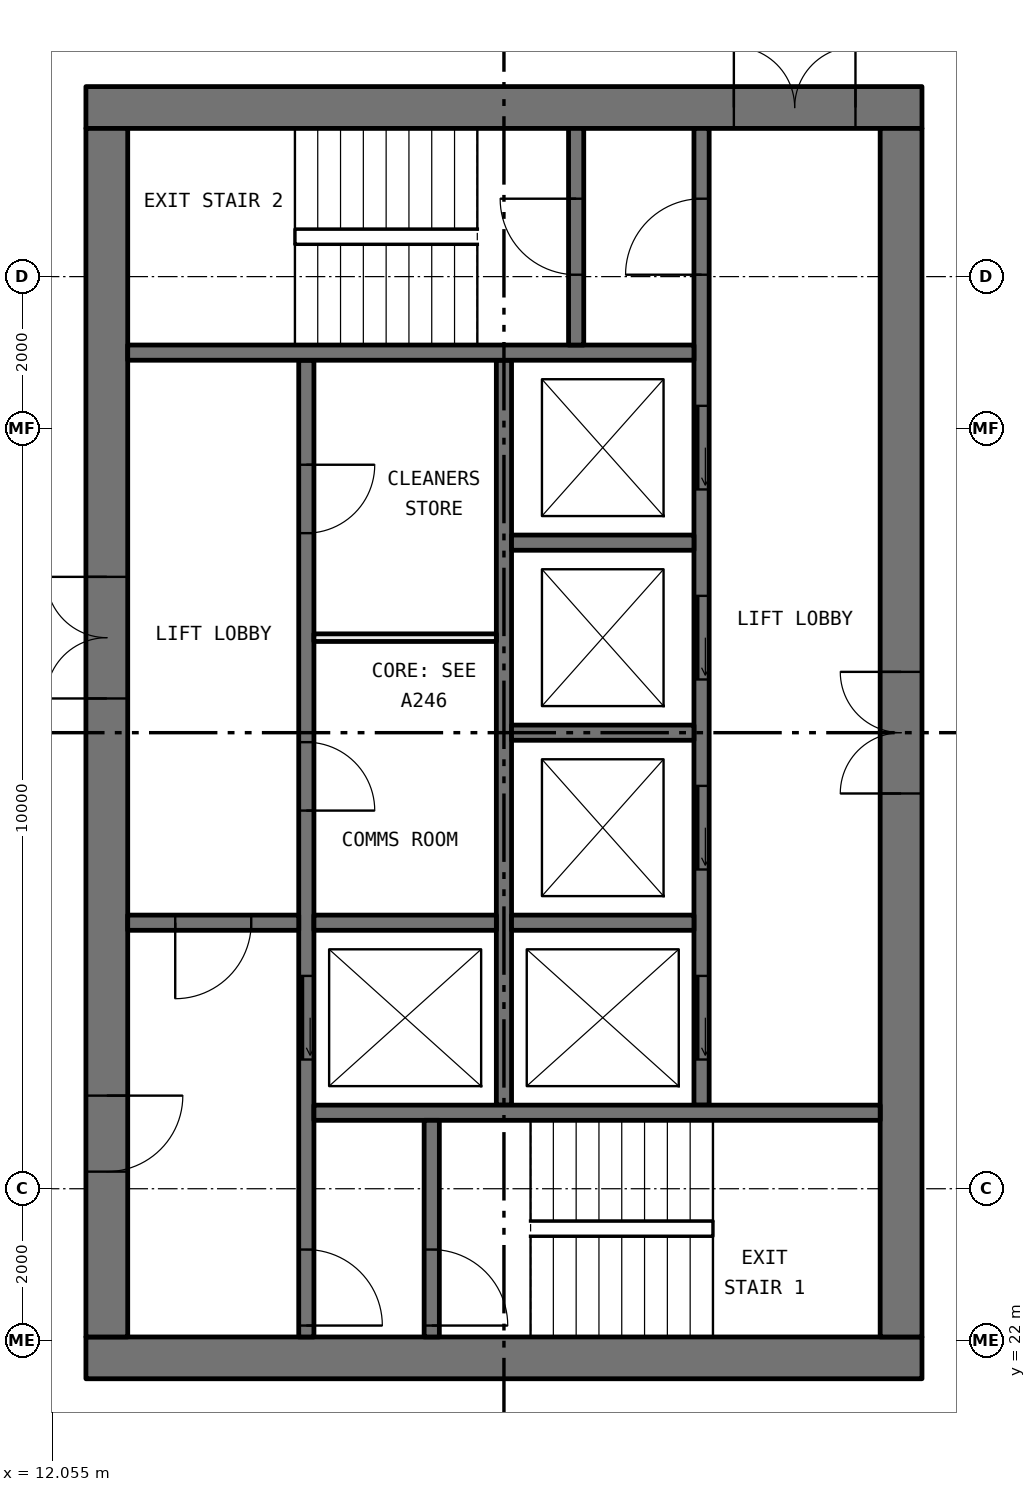
"""IFC4 building model, lengths in metres.
Left out: names, types, materials, properties, quantities, classifications, styles, units other than length and angle.
Written with IfcOpenShell. Run it as: python <this file> out.ifc"""

import sys

from ifc_helpers import new_model, si_unit, direction, frame, frame_2d, origin, place, context, subcontext, project, spatial, rectangle, extrude, element, fill, save


model = new_model("IFC4")
c1 = context("Model", 3, precision=1e-05, world=origin(), true_north=direction((0.0, 1.0)))
c2 = subcontext(c1, "Body", "Model", "MODEL_VIEW")
j1 = project(units=[si_unit("LENGTHUNIT", "METRE"), si_unit("PLANEANGLEUNIT", "RADIAN")], contexts=[c1])
p1 = place(None, origin())
s1 = spatial("IfcSite", under=j1, at=p1, CompositionType="ELEMENT")
p2 = place(p1, origin())
s2 = spatial("IfcBuilding", under=s1, at=p2, CompositionType="ELEMENT")
p3 = place(p2, frame((0.0, 0.0, 172.05)))
s3 = spatial("IfcBuildingStorey", under=s2, at=p3, CompositionType="ELEMENT", Elevation=172.05)
p4 = place(p3, frame((12.5, 21.775, 0.0), z_axis=(0.0, 0.0, 1.0), x_axis=(1.0, 0.0, 0.0)))
e1 = element("IfcWall", 1, at=p4, inside=s3, PredefinedType="SHEAR", context=c2, shape_type="SweptSolid", body=[
    extrude(rectangle(XDim=11.0, YDim=0.55, at=frame_2d((5.5, 0.0))), origin(), (0.0, 0.0, 1.0), 3.05),
])
p5 = place(p3, frame((12.5, 38.225, 0.0), z_axis=(0.0, 0.0, 1.0), x_axis=(1.0, 0.0, 0.0)))
e2 = element("IfcWall", 2, at=p5, inside=s3, PredefinedType="SHEAR", context=c2, shape_type="SweptSolid", body=[
    extrude(rectangle(XDim=11.0, YDim=0.55, at=frame_2d((5.5, 0.0))), origin(), (0.0, 0.0, 1.0), 3.05),
])
p6 = place(p5, frame((8.525, 0.0, 0.0)))
e3 = element("IfcOpeningElement", 3, at=p6, cuts=e2, PredefinedType="OPENING", context=c2, shape_type="SweptSolid", body=[
    extrude(rectangle(XDim=1.6, YDim=2.1, at=frame_2d((0.8, 1.05))), frame((0.0, 0.285, 0.0), z_axis=(0.0, -1.0, 0.0), x_axis=(1.0, 0.0, 0.0)), (0.0, 0.0, 1.0), 0.57),
])
p7 = place(p3, frame((12.775, 22.05, 0.0), z_axis=(0.0, 0.0, 1.0), x_axis=(0.0, 1.0, 0.0)))
e4 = element("IfcWall", 4, at=p7, inside=s3, PredefinedType="SHEAR", context=c2, shape_type="SweptSolid", body=[
    extrude(rectangle(XDim=15.9, YDim=0.55, at=frame_2d((7.95, 0.0))), origin(), (0.0, 0.0, 1.0), 3.05),
])
p8 = place(p7, frame((8.4, 0.0, 0.0)))
e5 = element("IfcOpeningElement", 5, at=p8, cuts=e4, PredefinedType="OPENING", context=c2, shape_type="SweptSolid", body=[
    extrude(rectangle(XDim=1.6, YDim=2.1, at=frame_2d((0.8, 1.05))), frame((0.0, 0.285, 0.0), z_axis=(0.0, -1.0, 0.0), x_axis=(1.0, 0.0, 0.0)), (0.0, 0.0, 1.0), 0.57),
])
p9 = place(p7, frame((2.175, 0.0, 0.0)))
e6 = element("IfcOpeningElement", 6, at=p9, cuts=e4, PredefinedType="OPENING", context=c2, shape_type="SweptSolid", body=[
    extrude(rectangle(XDim=1.0, YDim=2.1, at=frame_2d((0.5, 1.05))), frame((0.0, 0.285, 0.0), z_axis=(0.0, -1.0, 0.0), x_axis=(1.0, 0.0, 0.0)), (0.0, 0.0, 1.0), 0.57),
])
p10 = place(p3, frame((23.225, 22.05, 0.0), z_axis=(0.0, 0.0, 1.0), x_axis=(0.0, 1.0, 0.0)))
e7 = element("IfcWall", 7, at=p10, inside=s3, PredefinedType="SHEAR", context=c2, shape_type="SweptSolid", body=[
    extrude(rectangle(XDim=15.9, YDim=0.55, at=frame_2d((7.95, 0.0))), origin(), (0.0, 0.0, 1.0), 3.05),
])
p11 = place(p10, frame((7.15, 0.0, 0.0)))
e8 = element("IfcOpeningElement", 8, at=p11, cuts=e7, PredefinedType="OPENING", context=c2, shape_type="SweptSolid", body=[
    extrude(rectangle(XDim=1.6, YDim=2.1, at=frame_2d((0.8, 1.05))), frame((0.0, 0.285, 0.0), z_axis=(0.0, -1.0, 0.0), x_axis=(1.0, 0.0, 0.0)), (0.0, 0.0, 1.0), 0.57),
])
p12 = place(p3, frame((15.4, 22.05, 0.0), z_axis=(0.0, 0.0, 1.0), x_axis=(0.0, 1.0, 0.0)))
e9 = element("IfcWall", 9, at=p12, inside=s3, PredefinedType="SOLIDWALL", context=c2, shape_type="SweptSolid", body=[
    extrude(rectangle(XDim=12.85, YDim=0.2, at=frame_2d((6.425, 0.0))), origin(), (0.0, 0.0, 1.0), 3.05),
])
p13 = place(p12, frame((3.65, 0.0, 0.0)))
e10 = element("IfcOpeningElement", 10, at=p13, cuts=e9, PredefinedType="OPENING", context=c2, shape_type="SweptSolid", body=[
    extrude(rectangle(XDim=1.1, YDim=2.1, at=frame_2d((0.55, 1.05))), frame((0.0, 0.11, 0.0), z_axis=(0.0, -1.0, 0.0), x_axis=(1.0, 0.0, 0.0)), (0.0, 0.0, 1.0), 0.22),
])
p14 = place(p12, frame((0.15, 0.0, 0.0)))
e11 = element("IfcOpeningElement", 11, at=p14, cuts=e9, PredefinedType="OPENING", context=c2, shape_type="SweptSolid", body=[
    extrude(rectangle(XDim=1.0, YDim=2.1, at=frame_2d((0.5, 1.05))), frame((0.0, 0.11, 0.0), z_axis=(0.0, -1.0, 0.0), x_axis=(1.0, 0.0, 0.0)), (0.0, 0.0, 1.0), 0.22),
])
p15 = place(p12, frame((6.925, 0.0, 0.0)))
e12 = element("IfcOpeningElement", 12, at=p15, cuts=e9, PredefinedType="OPENING", context=c2, shape_type="SweptSolid", body=[
    extrude(rectangle(XDim=0.9, YDim=2.1, at=frame_2d((0.45, 1.05))), frame((0.0, 0.11, 0.0), z_axis=(0.0, -1.0, 0.0), x_axis=(1.0, 0.0, 0.0)), (0.0, 0.0, 1.0), 0.22),
])
p16 = place(p12, frame((10.575, 0.0, 0.0)))
e13 = element("IfcOpeningElement", 13, at=p16, cuts=e9, PredefinedType="OPENING", context=c2, shape_type="SweptSolid", body=[
    extrude(rectangle(XDim=0.9, YDim=2.1, at=frame_2d((0.45, 1.05))), frame((0.0, 0.11, 0.0), z_axis=(0.0, -1.0, 0.0), x_axis=(1.0, 0.0, 0.0)), (0.0, 0.0, 1.0), 0.22),
])
p17 = place(p3, frame((20.6, 25.1, 0.0), z_axis=(0.0, 0.0, 1.0), x_axis=(0.0, 1.0, 0.0)))
e14 = element("IfcWall", 14, at=p17, inside=s3, PredefinedType="SOLIDWALL", context=c2, shape_type="SweptSolid", body=[
    extrude(rectangle(XDim=12.85, YDim=0.2, at=frame_2d((6.425, 0.0))), origin(), (0.0, 0.0, 1.0), 3.05),
])
p18 = place(p17, frame((0.6, 0.0, 0.0)))
e15 = element("IfcOpeningElement", 15, at=p18, cuts=e14, PredefinedType="OPENING", context=c2, shape_type="SweptSolid", body=[
    extrude(rectangle(XDim=1.1, YDim=2.1, at=frame_2d((0.55, 1.05))), frame((0.0, 0.11, 0.0), z_axis=(0.0, -1.0, 0.0), x_axis=(1.0, 0.0, 0.0)), (0.0, 0.0, 1.0), 0.22),
])
p19 = place(p17, frame((3.1, 0.0, 0.0)))
e16 = element("IfcOpeningElement", 16, at=p19, cuts=e14, PredefinedType="OPENING", context=c2, shape_type="SweptSolid", body=[
    extrude(rectangle(XDim=1.1, YDim=2.1, at=frame_2d((0.55, 1.05))), frame((0.0, 0.11, 0.0), z_axis=(0.0, -1.0, 0.0), x_axis=(1.0, 0.0, 0.0)), (0.0, 0.0, 1.0), 0.22),
])
p20 = place(p17, frame((5.6, 0.0, 0.0)))
e17 = element("IfcOpeningElement", 17, at=p20, cuts=e14, PredefinedType="OPENING", context=c2, shape_type="SweptSolid", body=[
    extrude(rectangle(XDim=1.1, YDim=2.1, at=frame_2d((0.55, 1.05))), frame((0.0, 0.11, 0.0), z_axis=(0.0, -1.0, 0.0), x_axis=(1.0, 0.0, 0.0)), (0.0, 0.0, 1.0), 0.22),
])
p21 = place(p17, frame((8.1, 0.0, 0.0)))
e18 = element("IfcOpeningElement", 18, at=p21, cuts=e14, PredefinedType="OPENING", context=c2, shape_type="SweptSolid", body=[
    extrude(rectangle(XDim=1.1, YDim=2.1, at=frame_2d((0.55, 1.05))), frame((0.0, 0.11, 0.0), z_axis=(0.0, -1.0, 0.0), x_axis=(1.0, 0.0, 0.0)), (0.0, 0.0, 1.0), 0.22),
])
p22 = place(p17, frame((10.925, 0.0, 0.0)))
e19 = element("IfcOpeningElement", 19, at=p22, cuts=e14, PredefinedType="OPENING", context=c2, shape_type="SweptSolid", body=[
    extrude(rectangle(XDim=1.0, YDim=2.1, at=frame_2d((0.5, 1.05))), frame((0.0, 0.11, 0.0), z_axis=(0.0, -1.0, 0.0), x_axis=(1.0, 0.0, 0.0)), (0.0, 0.0, 1.0), 0.22),
])
p23 = place(p3, frame((18.0, 25.1, 0.0), z_axis=(0.0, 0.0, 1.0), x_axis=(0.0, 1.0, 0.0)))
e20 = element("IfcWall", 20, at=p23, inside=s3, PredefinedType="SOLIDWALL", context=c2, shape_type="SweptSolid", body=[
    extrude(rectangle(XDim=9.8, YDim=0.2, at=frame_2d((4.9, 0.0))), origin(), (0.0, 0.0, 1.0), 3.05),
])
for number, where, z_axis, x_axis in (
    (21, (15.5, 25.0, 0.0), (0.0, 0.0, 1.0), (1.0, 0.0, 0.0)),
    (22, (13.05, 35.0, 0.0), (0.0, 0.0, 1.0), (1.0, 0.0, 0.0)),
):
    element("IfcWall", number, at=place(p3, frame(where, z_axis=z_axis, x_axis=x_axis)), inside=s3, PredefinedType="SOLIDWALL", context=c2, shape_type="SweptSolid", body=[
        extrude(rectangle(XDim=7.45, YDim=0.2, at=frame_2d((3.725, 0.0))), origin(), (0.0, 0.0, 1.0), 3.05),
    ])
p24 = place(p3, frame((13.05, 27.5, 0.0), z_axis=(0.0, 0.0, 1.0), x_axis=(1.0, 0.0, 0.0)))
e23 = element("IfcWall", 23, at=p24, inside=s3, PredefinedType="SOLIDWALL", context=c2, shape_type="SweptSolid", body=[
    extrude(rectangle(XDim=2.25, YDim=0.2, at=frame_2d((1.125, 0.0))), origin(), (0.0, 0.0, 1.0), 3.05),
])
p25 = place(p24, frame((0.625, 0.0, 0.0)))
e24 = element("IfcOpeningElement", 24, at=p25, cuts=e23, PredefinedType="OPENING", context=c2, shape_type="SweptSolid", body=[
    extrude(rectangle(XDim=1.0, YDim=2.1, at=frame_2d((0.5, 1.05))), frame((0.0, 0.11, 0.0), z_axis=(0.0, -1.0, 0.0), x_axis=(1.0, 0.0, 0.0)), (0.0, 0.0, 1.0), 0.22),
])
p26 = place(p3, frame((17.05, 22.05, 0.0), z_axis=(0.0, 0.0, 1.0), x_axis=(0.0, 1.0, 0.0)))
e25 = element("IfcWall", 25, at=p26, inside=s3, PredefinedType="SOLIDWALL", context=c2, shape_type="SweptSolid", body=[
    extrude(rectangle(XDim=2.85, YDim=0.2, at=frame_2d((1.425, 0.0))), origin(), (0.0, 0.0, 1.0), 3.05),
])
p27 = place(p26, frame((0.15, 0.0, 0.0)))
e26 = element("IfcOpeningElement", 26, at=p27, cuts=e25, PredefinedType="OPENING", context=c2, shape_type="SweptSolid", body=[
    extrude(rectangle(XDim=1.0, YDim=2.1, at=frame_2d((0.5, 1.05))), frame((0.0, 0.11, 0.0), z_axis=(0.0, -1.0, 0.0), x_axis=(1.0, 0.0, 0.0)), (0.0, 0.0, 1.0), 0.22),
])
p28 = place(p3, frame((18.95, 35.1, 0.0), z_axis=(0.0, 0.0, 1.0), x_axis=(0.0, 1.0, 0.0)))
e27 = element("IfcWall", 27, at=p28, inside=s3, PredefinedType="SOLIDWALL", context=c2, shape_type="SweptSolid", body=[
    extrude(rectangle(XDim=2.85, YDim=0.2, at=frame_2d((1.425, 0.0))), origin(), (0.0, 0.0, 1.0), 3.05),
])
p29 = place(p28, frame((0.925, 0.0, 0.0)))
e28 = element("IfcOpeningElement", 28, at=p29, cuts=e27, PredefinedType="OPENING", context=c2, shape_type="SweptSolid", body=[
    extrude(rectangle(XDim=1.0, YDim=2.1, at=frame_2d((0.5, 1.05))), frame((0.0, 0.11, 0.0), z_axis=(0.0, -1.0, 0.0), x_axis=(1.0, 0.0, 0.0)), (0.0, 0.0, 1.0), 0.22),
])
for number, where, z_axis, x_axis in (
    (29, (15.5, 27.5, 0.0), (0.0, 0.0, 1.0), (1.0, 0.0, 0.0)),
    (30, (18.1, 27.5, 0.0), (0.0, 0.0, 1.0), (1.0, 0.0, 0.0)),
    (31, (18.1, 30.0, 0.0), (0.0, 0.0, 1.0), (1.0, 0.0, 0.0)),
    (32, (18.1, 32.5, 0.0), (0.0, 0.0, 1.0), (1.0, 0.0, 0.0)),
):
    element("IfcWall", number, at=place(p3, frame(where, z_axis=z_axis, x_axis=x_axis)), inside=s3, PredefinedType="SOLIDWALL", context=c2, shape_type="SweptSolid", body=[
        extrude(rectangle(XDim=2.4, YDim=0.2, at=frame_2d((1.2, 0.0))), origin(), (0.0, 0.0, 1.0), 3.05),
    ])
p30 = place(p3, frame((15.5, 31.25, 0.0), z_axis=(0.0, 0.0, 1.0), x_axis=(1.0, 0.0, 0.0)))
e33 = element("IfcWall", 33, at=p30, inside=s3, PredefinedType="PARTITIONING", context=c2, shape_type="SweptSolid", body=[
    extrude(rectangle(XDim=2.4, YDim=0.1, at=frame_2d((1.2, 0.0))), origin(), (0.0, 0.0, 1.0), 3.05),
])
p31 = place(p18, origin())
e34 = element("IfcDoor", 34, at=p31, inside=s3, OperationType="SLIDING_TO_LEFT", PredefinedType="DOOR", context=c2, shape_type="SweptSolid", body=[
    extrude(rectangle(XDim=1.1, YDim=2.1, at=frame_2d((0.55, 1.05))), frame((0.0, 0.025, 0.0), z_axis=(0.0, -1.0, 0.0), x_axis=(1.0, 0.0, 0.0)), (0.0, 0.0, 1.0), 0.05),
])
fill(e15, e34)
p32 = place(p19, origin())
e35 = element("IfcDoor", 35, at=p32, inside=s3, OperationType="SLIDING_TO_LEFT", PredefinedType="DOOR", context=c2, shape_type="SweptSolid", body=[
    extrude(rectangle(XDim=1.1, YDim=2.1, at=frame_2d((0.55, 1.05))), frame((0.0, 0.025, 0.0), z_axis=(0.0, -1.0, 0.0), x_axis=(1.0, 0.0, 0.0)), (0.0, 0.0, 1.0), 0.05),
])
fill(e16, e35)
p33 = place(p20, origin())
e36 = element("IfcDoor", 36, at=p33, inside=s3, OperationType="SLIDING_TO_LEFT", PredefinedType="DOOR", context=c2, shape_type="SweptSolid", body=[
    extrude(rectangle(XDim=1.1, YDim=2.1, at=frame_2d((0.55, 1.05))), frame((0.0, 0.025, 0.0), z_axis=(0.0, -1.0, 0.0), x_axis=(1.0, 0.0, 0.0)), (0.0, 0.0, 1.0), 0.05),
])
fill(e17, e36)
p34 = place(p21, origin())
e37 = element("IfcDoor", 37, at=p34, inside=s3, OperationType="SLIDING_TO_LEFT", PredefinedType="DOOR", context=c2, shape_type="SweptSolid", body=[
    extrude(rectangle(XDim=1.1, YDim=2.1, at=frame_2d((0.55, 1.05))), frame((0.0, 0.025, 0.0), z_axis=(0.0, -1.0, 0.0), x_axis=(1.0, 0.0, 0.0)), (0.0, 0.0, 1.0), 0.05),
])
fill(e18, e37)
p35 = place(p13, origin())
e38 = element("IfcDoor", 38, at=p35, inside=s3, OperationType="SLIDING_TO_LEFT", PredefinedType="DOOR", context=c2, shape_type="SweptSolid", body=[
    extrude(rectangle(XDim=1.1, YDim=2.1, at=frame_2d((0.55, 1.05))), frame((0.0, 0.025, 0.0), z_axis=(0.0, -1.0, 0.0), x_axis=(1.0, 0.0, 0.0)), (0.0, 0.0, 1.0), 0.05),
])
fill(e10, e38)
p36 = place(p27, frame((1.0, 0.0, 0.0), x_axis=(-1.0, 0.0, 0.0)))
e39 = element("IfcDoor", 39, at=p36, inside=s3, OperationType="SINGLE_SWING_LEFT", PredefinedType="DOOR", context=c2, shape_type="SweptSolid", body=[
    extrude(rectangle(XDim=1.0, YDim=2.1, at=frame_2d((0.5, 1.05))), frame((0.0, 0.025, 0.0), z_axis=(0.0, -1.0, 0.0), x_axis=(1.0, 0.0, 0.0)), (0.0, 0.0, 1.0), 0.05),
])
fill(e26, e39)
p37 = place(p14, frame((1.0, 0.0, 0.0), x_axis=(-1.0, 0.0, 0.0)))
e40 = element("IfcDoor", 40, at=p37, inside=s3, OperationType="SINGLE_SWING_LEFT", PredefinedType="DOOR", context=c2, shape_type="SweptSolid", body=[
    extrude(rectangle(XDim=1.0, YDim=2.1, at=frame_2d((0.5, 1.05))), frame((0.0, 0.025, 0.0), z_axis=(0.0, -1.0, 0.0), x_axis=(1.0, 0.0, 0.0)), (0.0, 0.0, 1.0), 0.05),
])
fill(e11, e40)
p38 = place(p22, origin())
e41 = element("IfcDoor", 41, at=p38, inside=s3, OperationType="SINGLE_SWING_RIGHT", PredefinedType="DOOR", context=c2, shape_type="SweptSolid", body=[
    extrude(rectangle(XDim=1.0, YDim=2.1, at=frame_2d((0.5, 1.05))), frame((0.0, 0.025, 0.0), z_axis=(0.0, -1.0, 0.0), x_axis=(1.0, 0.0, 0.0)), (0.0, 0.0, 1.0), 0.05),
])
fill(e19, e41)
p39 = place(p29, origin())
e42 = element("IfcDoor", 42, at=p39, inside=s3, OperationType="SINGLE_SWING_LEFT", PredefinedType="DOOR", context=c2, shape_type="SweptSolid", body=[
    extrude(rectangle(XDim=1.0, YDim=2.1, at=frame_2d((0.5, 1.05))), frame((0.0, 0.025, 0.0), z_axis=(0.0, -1.0, 0.0), x_axis=(1.0, 0.0, 0.0)), (0.0, 0.0, 1.0), 0.05),
])
fill(e28, e42)
p40 = place(p25, frame((1.0, 0.0, 0.0), x_axis=(-1.0, 0.0, 0.0)))
e43 = element("IfcDoor", 43, at=p40, inside=s3, OperationType="SINGLE_SWING_LEFT", PredefinedType="DOOR", context=c2, shape_type="SweptSolid", body=[
    extrude(rectangle(XDim=1.0, YDim=2.1, at=frame_2d((0.5, 1.05))), frame((0.0, 0.025, 0.0), z_axis=(0.0, -1.0, 0.0), x_axis=(1.0, 0.0, 0.0)), (0.0, 0.0, 1.0), 0.05),
])
fill(e24, e43)
p41 = place(p8, origin())
e44 = element("IfcDoor", 44, at=p41, inside=s3, OperationType="DOUBLE_DOOR_SINGLE_SWING", PredefinedType="DOOR", context=c2, shape_type="SweptSolid", body=[
    extrude(rectangle(XDim=1.6, YDim=2.1, at=frame_2d((0.8, 1.05))), frame((0.0, 0.025, 0.0), z_axis=(0.0, -1.0, 0.0), x_axis=(1.0, 0.0, 0.0)), (0.0, 0.0, 1.0), 0.05),
])
fill(e5, e44)
p42 = place(p9, frame((1.0, 0.0, 0.0), x_axis=(-1.0, 0.0, 0.0)))
e45 = element("IfcDoor", 45, at=p42, inside=s3, OperationType="SINGLE_SWING_RIGHT", PredefinedType="DOOR", context=c2, shape_type="SweptSolid", body=[
    extrude(rectangle(XDim=1.0, YDim=2.1, at=frame_2d((0.5, 1.05))), frame((0.0, 0.025, 0.0), z_axis=(0.0, -1.0, 0.0), x_axis=(1.0, 0.0, 0.0)), (0.0, 0.0, 1.0), 0.05),
])
fill(e6, e45)
p43 = place(p6, origin())
e46 = element("IfcDoor", 46, at=p43, inside=s3, OperationType="DOUBLE_DOOR_SINGLE_SWING", PredefinedType="DOOR", context=c2, shape_type="SweptSolid", body=[
    extrude(rectangle(XDim=1.6, YDim=2.1, at=frame_2d((0.8, 1.05))), frame((0.0, 0.025, 0.0), z_axis=(0.0, -1.0, 0.0), x_axis=(1.0, 0.0, 0.0)), (0.0, 0.0, 1.0), 0.05),
])
fill(e3, e46)
p44 = place(p11, origin())
e47 = element("IfcDoor", 47, at=p44, inside=s3, OperationType="DOUBLE_DOOR_SINGLE_SWING", PredefinedType="DOOR", context=c2, shape_type="SweptSolid", body=[
    extrude(rectangle(XDim=1.6, YDim=2.1, at=frame_2d((0.8, 1.05))), frame((0.0, 0.025, 0.0), z_axis=(0.0, -1.0, 0.0), x_axis=(1.0, 0.0, 0.0)), (0.0, 0.0, 1.0), 0.05),
])
fill(e8, e47)
p45 = place(p15, frame((0.9, 0.0, 0.0), x_axis=(-1.0, 0.0, 0.0)))
e48 = element("IfcDoor", 48, at=p45, inside=s3, OperationType="SINGLE_SWING_LEFT", PredefinedType="DOOR", context=c2, shape_type="SweptSolid", body=[
    extrude(rectangle(XDim=0.9, YDim=2.1, at=frame_2d((0.45, 1.05))), frame((0.0, 0.025, 0.0), z_axis=(0.0, -1.0, 0.0), x_axis=(1.0, 0.0, 0.0)), (0.0, 0.0, 1.0), 0.05),
])
fill(e12, e48)
p46 = place(p16, frame((0.9, 0.0, 0.0), x_axis=(-1.0, 0.0, 0.0)))
e49 = element("IfcDoor", 49, at=p46, inside=s3, OperationType="SINGLE_SWING_RIGHT", PredefinedType="DOOR", context=c2, shape_type="SweptSolid", body=[
    extrude(rectangle(XDim=0.9, YDim=2.1, at=frame_2d((0.45, 1.05))), frame((0.0, 0.025, 0.0), z_axis=(0.0, -1.0, 0.0), x_axis=(1.0, 0.0, 0.0)), (0.0, 0.0, 1.0), 0.05),
])
fill(e13, e49)
save(model, sys.argv[1])
